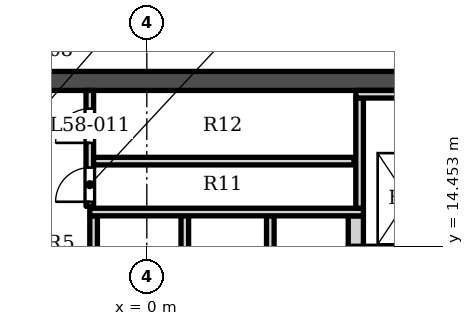
"""IFC4 building model, lengths in metres.
Left out: names, types, materials, properties, quantities, classifications, styles, units other than length and angle.
Written with IfcOpenShell. Run it as: python <this file> out.ifc"""

import sys

from ifc_helpers import new_model, si_unit, direction, frame, frame_2d, origin, place, context, subcontext, project, spatial, rectangle, extrude, element, fill, save


model = new_model("IFC4")
c1 = context("Model", 3, precision=1e-05, world=origin(), true_north=direction((0.0, 1.0)))
c2 = subcontext(c1, "Body", "Model", "MODEL_VIEW")
j1 = project(units=[si_unit("LENGTHUNIT", "METRE"), si_unit("PLANEANGLEUNIT", "RADIAN")], contexts=[c1])
p1 = place(None, origin())
s1 = spatial("IfcSite", under=j1, at=p1, CompositionType="ELEMENT")
p2 = place(p1, origin())
s2 = spatial("IfcBuilding", under=s1, at=p2, CompositionType="ELEMENT")
p3 = place(p2, frame((0.0, 0.0, 243.2)))
s3 = spatial("IfcBuildingStorey", under=s2, at=p3, CompositionType="ELEMENT", Elevation=243.2)
p4 = place(p3, frame((-13.9, 18.802, 0.0), z_axis=(0.0, 0.0, 1.0), x_axis=(1.0, 0.0, 0.0)))
e1 = element("IfcWall", 1, at=p4, inside=s3, PredefinedType="SHEAR", context=c2, shape_type="SweptSolid", body=[
    extrude(rectangle(XDim=27.8, YDim=0.5, at=frame_2d((13.9, 0.0))), origin(), (0.0, 0.0, 1.0), 5.0),
])
for number, where, z_axis, x_axis in (
    (2, (-1.4, 12.653, 0.0), (0.0, 0.0, 1.0), (0.0, 1.0, 0.0)),
    (3, (1.0, 12.653, 0.0), (0.0, 0.0, 1.0), (0.0, 1.0, 0.0)),
    (4, (3.25, 12.653, 0.0), (0.0, 0.0, 1.0), (0.0, 1.0, 0.0)),
):
    element("IfcWall", number, at=place(p3, frame(where, z_axis=z_axis, x_axis=x_axis)), inside=s3, PredefinedType="SOLIDWALL", context=c2, shape_type="SweptSolid", body=[
        extrude(rectangle(XDim=2.6, YDim=0.2, at=frame_2d((1.3, 0.0))), origin(), (0.0, 0.0, 1.0), 4.83),
    ])
p5 = place(p3, frame((5.5, 14.453, 0.0), z_axis=(0.0, 0.0, 1.0), x_axis=(0.0, 1.0, 0.0)))
e5 = element("IfcWall", 5, at=p5, inside=s3, PredefinedType="SOLIDWALL", context=c2, shape_type="SweptSolid", body=[
    extrude(rectangle(XDim=0.8, YDim=0.4, at=frame_2d((0.4, 0.0))), origin(), (0.0, 0.0, 1.0), 4.83),
])
p6 = place(p3, frame((-1.5, 15.353, 0.0), z_axis=(0.0, 0.0, 1.0), x_axis=(1.0, 0.0, 0.0)))
e6 = element("IfcWall", 6, at=p6, inside=s3, PredefinedType="SOLIDWALL", context=c2, shape_type="SweptSolid", body=[
    extrude(rectangle(XDim=7.2, YDim=0.2, at=frame_2d((3.6, 0.0))), origin(), (0.0, 0.0, 1.0), 4.83),
])
p7 = place(p3, frame((5.6, 15.453, 0.0), z_axis=(0.0, 0.0, 1.0), x_axis=(0.0, 1.0, 0.0)))
e7 = element("IfcWall", 7, at=p7, inside=s3, PredefinedType="SOLIDWALL", context=c2, shape_type="SweptSolid", body=[
    extrude(rectangle(XDim=2.9, YDim=0.2, at=frame_2d((1.45, 0.0))), origin(), (0.0, 0.0, 1.0), 4.83),
])
p8 = place(p3, frame((-1.5, 15.503, 0.0), z_axis=(0.0, 0.0, 1.0), x_axis=(0.0, 1.0, 0.0)))
e8 = element("IfcWall", 8, at=p8, inside=s3, PredefinedType="SOLIDWALL", context=c2, shape_type="SweptSolid", body=[
    extrude(rectangle(XDim=3.05, YDim=0.2, at=frame_2d((1.525, 0.0))), origin(), (0.0, 0.0, 1.0), 4.83),
])
p9 = place(p8, frame((0.12, 0.0, 0.0)))
e9 = element("IfcOpeningElement", 9, at=p9, cuts=e8, PredefinedType="OPENING", context=c2, shape_type="SweptSolid", body=[
    extrude(rectangle(XDim=0.9, YDim=2.1, at=frame_2d((0.45, 1.05))), frame((0.0, 0.11, 0.0), z_axis=(0.0, -1.0, 0.0), x_axis=(1.0, 0.0, 0.0)), (0.0, 0.0, 1.0), 0.22),
])
p10 = place(p8, frame((1.67, 0.0, 0.0)))
e10 = element("IfcOpeningElement", 10, at=p10, cuts=e8, PredefinedType="OPENING", context=c2, shape_type="SweptSolid", body=[
    extrude(rectangle(XDim=0.9, YDim=2.1, at=frame_2d((0.45, 1.05))), frame((0.0, 0.11, 0.0), z_axis=(0.0, -1.0, 0.0), x_axis=(1.0, 0.0, 0.0)), (0.0, 0.0, 1.0), 0.22),
])
p11 = place(p3, frame((-1.4, 16.693, 0.0), z_axis=(0.0, 0.0, 1.0), x_axis=(1.0, 0.0, 0.0)))
e11 = element("IfcWall", 11, at=p11, inside=s3, PredefinedType="SOLIDWALL", context=c2, shape_type="SweptSolid", body=[
    extrude(rectangle(XDim=6.85, YDim=0.2, at=frame_2d((3.425, 0.0))), origin(), (0.0, 0.0, 1.0), 4.83),
])
p12 = place(p3, frame((5.5, 18.453, 0.0), z_axis=(0.0, 0.0, 1.0), x_axis=(1.0, 0.0, 0.0)))
e12 = element("IfcWall", 12, at=p12, inside=s3, PredefinedType="SOLIDWALL", context=c2, shape_type="SweptSolid", body=[
    extrude(rectangle(XDim=2.55, YDim=0.2, at=frame_2d((1.275, 0.0))), origin(), (0.0, 0.0, 1.0), 4.83),
])
p13 = place(p9, origin())
e13 = element("IfcDoor", 13, at=p13, inside=s3, OperationType="SINGLE_SWING_LEFT", PredefinedType="DOOR", context=c2, shape_type="SweptSolid", body=[
    extrude(rectangle(XDim=0.9, YDim=2.1, at=frame_2d((0.45, 1.05))), frame((0.0, 0.025, 0.0), z_axis=(0.0, -1.0, 0.0), x_axis=(1.0, 0.0, 0.0)), (0.0, 0.0, 1.0), 0.05),
])
fill(e9, e13)
p14 = place(p10, origin())
e14 = element("IfcDoor", 14, at=p14, inside=s3, OperationType="SINGLE_SWING_LEFT", PredefinedType="DOOR", context=c2, shape_type="SweptSolid", body=[
    extrude(rectangle(XDim=0.9, YDim=2.1, at=frame_2d((0.45, 1.05))), frame((0.0, 0.025, 0.0), z_axis=(0.0, -1.0, 0.0), x_axis=(1.0, 0.0, 0.0)), (0.0, 0.0, 1.0), 0.05),
])
fill(e10, e14)
save(model, sys.argv[1])
